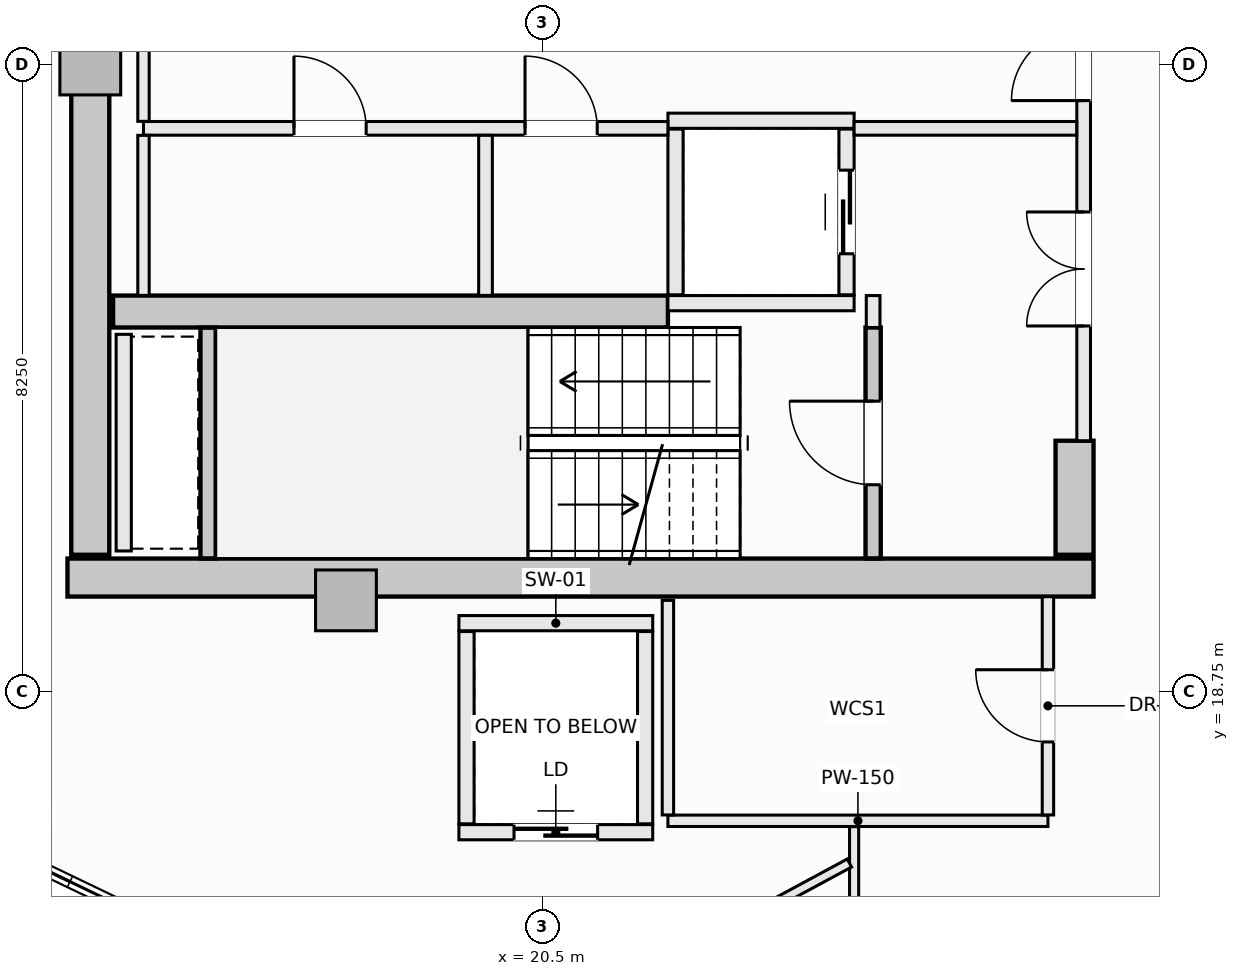
"""IFC4 building model, lengths in metres.
Left out: names, types, materials, properties, quantities, classifications, styles, units other than length and angle.
Written with IfcOpenShell. Run it as: python <this file> out.ifc"""

import sys

from ifc_helpers import new_model, si_unit, direction, frame, frame_2d, origin, origin_2d, place, context, subcontext, project, spatial, rectangle, extrude, element, fill, save


model = new_model("IFC4")
c1 = context("Model", 3, precision=1e-05, world=origin(), true_north=direction((0.0, 1.0)))
c2 = subcontext(c1, "Body", "Model", "MODEL_VIEW")
j1 = project(units=[si_unit("LENGTHUNIT", "METRE"), si_unit("PLANEANGLEUNIT", "RADIAN")], contexts=[c1])
p1 = place(None, origin())
s1 = spatial("IfcSite", under=j1, at=p1, CompositionType="ELEMENT")
p2 = place(p1, origin())
s2 = spatial("IfcBuilding", under=s1, at=p2, CompositionType="ELEMENT")
p3 = place(p2, frame((0.0, 0.0, 252.5)))
s3 = spatial("IfcBuildingStorey", under=s2, at=p3, CompositionType="ELEMENT", Elevation=252.5)
p4 = place(p3, frame((14.25, 20.25, -0.27), z_axis=(0.0, 0.0, 1.0), x_axis=(1.0, 0.0, 0.0)))
e1 = element("IfcWall", 1, at=p4, inside=s3, PredefinedType="SHEAR", context=c2, shape_type="SweptSolid", body=[
    extrude(rectangle(XDim=13.5, YDim=0.5, at=frame_2d((6.75, 0.0))), origin(), (0.0, 0.0, 1.0), 3.3),
])
p5 = place(p3, frame((14.55, 20.55, -0.27), z_axis=(0.0, 0.0, 1.0), x_axis=(0.0, 1.0, 0.0)))
e2 = element("IfcWall", 2, at=p5, inside=s3, PredefinedType="SHEAR", context=c2, shape_type="SweptSolid", body=[
    extrude(rectangle(XDim=12.9, YDim=0.5, at=frame_2d((6.45, 0.0))), origin(), (0.0, 0.0, 1.0), 3.3),
])
p6 = place(p3, frame((27.5, 20.55, -0.27), z_axis=(0.0, 0.0, 1.0), x_axis=(0.0, 1.0, 0.0)))
e3 = element("IfcWall", 3, at=p6, inside=s3, PredefinedType="SHEAR", context=c2, shape_type="SweptSolid", body=[
    extrude(rectangle(XDim=1.5, YDim=0.5, at=frame_2d((0.75, 0.0))), origin(), (0.0, 0.0, 1.0), 3.3),
])
p7 = place(p3, frame((14.85, 23.75, -0.27), z_axis=(0.0, 0.0, 1.0), x_axis=(1.0, 0.0, 0.0)))
e4 = element("IfcWall", 4, at=p7, inside=s3, PredefinedType="SHEAR", context=c2, shape_type="SweptSolid", body=[
    extrude(rectangle(XDim=7.3, YDim=0.42, at=frame_2d((3.65, 0.0))), origin(), (0.0, 0.0, 1.0), 3.3),
])
for number, where, z_axis, x_axis in (
    (5, (14.55, 27.0, -0.27), (0.0, 0.0, 1.0), (1.0, 0.0, 0.0)),
    (6, (17.914, 19.95, -0.27), (0.0, 0.0, 1.0), (1.0, 0.0, 0.0)),
):
    element("IfcColumn", number, at=place(p3, frame(where, z_axis=z_axis, x_axis=x_axis)), inside=s3, PredefinedType="PILASTER", context=c2, shape_type="SweptSolid", body=[
        extrude(rectangle(XDim=0.8, YDim=0.8, at=origin_2d()), origin(), (0.0, 0.0, 1.0), 3.3),
    ])
p8 = place(p3, frame((24.85, 20.502, -0.27), z_axis=(0.0, 0.0, 1.0), x_axis=(0.0, 1.0, 0.0)))
e7 = element("IfcWall", 7, at=p8, inside=s3, PredefinedType="SHEAR", context=c2, shape_type="SweptSolid", body=[
    extrude(rectangle(XDim=3.038, YDim=0.2, at=frame_2d((1.519, 0.0))), origin(), (0.0, 0.0, 1.0), 3.3),
])
p9 = place(p8, frame((0.969, 0.0, 0.27)))
e8 = element("IfcOpeningElement", 8, at=p9, cuts=e7, PredefinedType="OPENING", context=c2, shape_type="SweptSolid", body=[
    extrude(rectangle(XDim=1.1, YDim=2.15, at=frame_2d((0.55, 1.075))), frame((0.0, 0.11, 0.0), z_axis=(0.0, -1.0, 0.0), x_axis=(1.0, 0.0, 0.0)), (0.0, 0.0, 1.0), 0.22),
])
p10 = place(p3, frame((16.1, 20.502, -0.27), z_axis=(0.0, 0.0, 1.0), x_axis=(0.0, 1.0, 0.0)))
e9 = element("IfcWall", 9, at=p10, inside=s3, PredefinedType="SHEAR", context=c2, shape_type="SweptSolid", body=[
    extrude(rectangle(XDim=3.036, YDim=0.2, at=frame_2d((1.518, 0.0))), origin(), (0.0, 0.0, 1.0), 3.3),
])
for number, where, z_axis, x_axis in (
    (10, (22.15, 26.26, 0.0), (0.0, 0.0, 1.0), (1.0, 0.0, 0.0)),
    (11, (22.15, 23.86, 0.0), (0.0, 0.0, 1.0), (1.0, 0.0, 0.0)),
):
    element("IfcWall", number, at=place(p3, frame(where, z_axis=z_axis, x_axis=x_axis)), inside=s3, PredefinedType="SOLIDWALL", context=c2, shape_type="SweptSolid", body=[
        extrude(rectangle(XDim=2.45, YDim=0.2, at=frame_2d((1.225, 0.0))), origin(), (0.0, 0.0, 1.0), 3.03),
    ])
p11 = place(p3, frame((22.25, 23.97, 0.0), z_axis=(0.0, 0.0, 1.0), x_axis=(0.0, 1.0, 0.0)))
e12 = element("IfcWall", 12, at=p11, inside=s3, PredefinedType="SOLIDWALL", context=c2, shape_type="SweptSolid", body=[
    extrude(rectangle(XDim=2.18, YDim=0.2, at=frame_2d((1.09, 0.0))), origin(), (0.0, 0.0, 1.0), 3.03),
])
p12 = place(p3, frame((24.5, 23.97, 0.0), z_axis=(0.0, 0.0, 1.0), x_axis=(0.0, 1.0, 0.0)))
e13 = element("IfcWall", 13, at=p12, inside=s3, PredefinedType="SOLIDWALL", context=c2, shape_type="SweptSolid", body=[
    extrude(rectangle(XDim=2.18, YDim=0.2, at=frame_2d((1.09, 0.0))), origin(), (0.0, 0.0, 1.0), 3.03),
])
p13 = place(p12, frame((0.54, 0.0, 0.0)))
e14 = element("IfcOpeningElement", 14, at=p13, cuts=e13, PredefinedType="OPENING", context=c2, shape_type="SweptSolid", body=[
    extrude(rectangle(XDim=1.1, YDim=2.2, at=frame_2d((0.55, 1.1))), frame((0.0, 0.11, 0.0), z_axis=(0.0, -1.0, 0.0), x_axis=(1.0, 0.0, 0.0)), (0.0, 0.0, 1.0), 0.22),
])
p14 = place(p3, frame((19.4, 19.65, 0.0), z_axis=(0.0, 0.0, 1.0), x_axis=(1.0, 0.0, 0.0)))
e15 = element("IfcWall", 15, at=p14, inside=s3, PredefinedType="SOLIDWALL", context=c2, shape_type="SweptSolid", body=[
    extrude(rectangle(XDim=2.55, YDim=0.2, at=frame_2d((1.275, 0.0))), origin(), (0.0, 0.0, 1.0), 3.03),
])
p15 = place(p3, frame((19.4, 16.9, 0.0), z_axis=(0.0, 0.0, 1.0), x_axis=(1.0, 0.0, 0.0)))
e16 = element("IfcWall", 16, at=p15, inside=s3, PredefinedType="SOLIDWALL", context=c2, shape_type="SweptSolid", body=[
    extrude(rectangle(XDim=2.55, YDim=0.2, at=frame_2d((1.275, 0.0))), origin(), (0.0, 0.0, 1.0), 3.03),
])
p16 = place(p15, frame((0.725, 0.0, 0.0)))
e17 = element("IfcOpeningElement", 17, at=p16, cuts=e16, PredefinedType="OPENING", context=c2, shape_type="SweptSolid", body=[
    extrude(rectangle(XDim=1.1, YDim=2.2, at=frame_2d((0.55, 1.1))), frame((0.0, 0.11, 0.0), z_axis=(0.0, -1.0, 0.0), x_axis=(1.0, 0.0, 0.0)), (0.0, 0.0, 1.0), 0.22),
])
for number, where, z_axis, x_axis in (
    (18, (19.5, 17.01, 0.0), (0.0, 0.0, 1.0), (0.0, 1.0, 0.0)),
    (19, (21.85, 17.01, 0.0), (0.0, 0.0, 1.0), (0.0, 1.0, 0.0)),
):
    element("IfcWall", number, at=place(p3, frame(where, z_axis=z_axis, x_axis=x_axis)), inside=s3, PredefinedType="SOLIDWALL", context=c2, shape_type="SweptSolid", body=[
        extrude(rectangle(XDim=2.53, YDim=0.2, at=frame_2d((1.265, 0.0))), origin(), (0.0, 0.0, 1.0), 3.03),
    ])
p17 = place(p3, frame((14.99, 20.6, 0.0), z_axis=(0.0, 0.0, 1.0), x_axis=(0.0, 1.0, 0.0)))
e20 = element("IfcWall", 20, at=p17, inside=s3, PredefinedType="SOLIDWALL", context=c2, shape_type="SweptSolid", body=[
    extrude(rectangle(XDim=2.85, YDim=0.2, at=frame_2d((1.425, 0.0))), origin(), (0.0, 0.0, 1.0), 3.03),
])
p18 = place(p3, frame((24.85, 23.54, 0.0), z_axis=(0.0, 0.0, 1.0), x_axis=(0.0, 1.0, 0.0)))
e21 = element("IfcWall", 21, at=p18, inside=s3, PredefinedType="SOLIDWALL", context=c2, shape_type="SweptSolid", body=[
    extrude(rectangle(XDim=0.42, YDim=0.18, at=frame_2d((0.21, 0.0))), origin(), (0.0, 0.0, 1.0), 3.03),
])
p19 = place(p3, frame((27.62, 22.05, 0.0), z_axis=(0.0, 0.0, 1.0), x_axis=(0.0, 1.0, 0.0)))
e22 = element("IfcWall", 22, at=p19, inside=s3, PredefinedType="SOLIDWALL", context=c2, shape_type="SweptSolid", body=[
    extrude(rectangle(XDim=9.9, YDim=0.18, at=frame_2d((4.95, 0.0))), origin(), (0.0, 0.0, 1.0), 3.03),
])
p20 = place(p19, frame((4.475, 0.0, 0.0)))
e23 = element("IfcOpeningElement", 23, at=p20, cuts=e22, PredefinedType="OPENING", context=c2, shape_type="SweptSolid", body=[
    extrude(rectangle(XDim=0.95, YDim=2.1, at=frame_2d((0.475, 1.05))), frame((0.0, 0.1, 0.0), z_axis=(0.0, -1.0, 0.0), x_axis=(1.0, 0.0, 0.0)), (0.0, 0.0, 1.0), 0.2),
])
p21 = place(p19, frame((6.89, 0.0, 0.0)))
e24 = element("IfcOpeningElement", 24, at=p21, cuts=e22, PredefinedType="OPENING", context=c2, shape_type="SweptSolid", body=[
    extrude(rectangle(XDim=1.5, YDim=2.2, at=frame_2d((0.75, 1.1))), frame((0.0, 0.1, 0.0), z_axis=(0.0, -1.0, 0.0), x_axis=(1.0, 0.0, 0.0)), (0.0, 0.0, 1.0), 0.2),
])
p22 = place(p19, frame((1.51, 0.0, 0.0)))
e25 = element("IfcOpeningElement", 25, at=p22, cuts=e22, PredefinedType="OPENING", context=c2, shape_type="SweptSolid", body=[
    extrude(rectangle(XDim=1.5, YDim=2.2, at=frame_2d((0.75, 1.1))), frame((0.0, 0.1, 0.0), z_axis=(0.0, -1.0, 0.0), x_axis=(1.0, 0.0, 0.0)), (0.0, 0.0, 1.0), 0.2),
])
p23 = place(p3, frame((15.25, 26.16, 0.0), z_axis=(0.0, 0.0, 1.0), x_axis=(1.0, 0.0, 0.0)))
e26 = element("IfcWall", 26, at=p23, inside=s3, PredefinedType="SOLIDWALL", context=c2, shape_type="SweptSolid", body=[
    extrude(rectangle(XDim=6.9, YDim=0.18, at=frame_2d((3.45, 0.0))), origin(), (0.0, 0.0, 1.0), 3.03),
])
p24 = place(p23, frame((5.02, 0.0, 0.0)))
e27 = element("IfcOpeningElement", 27, at=p24, cuts=e26, PredefinedType="OPENING", context=c2, shape_type="SweptSolid", body=[
    extrude(rectangle(XDim=0.95, YDim=2.1, at=frame_2d((0.475, 1.05))), frame((0.0, 0.1, 0.0), z_axis=(0.0, -1.0, 0.0), x_axis=(1.0, 0.0, 0.0)), (0.0, 0.0, 1.0), 0.2),
])
p25 = place(p23, frame((1.98, 0.0, 0.0)))
e28 = element("IfcOpeningElement", 28, at=p25, cuts=e26, PredefinedType="OPENING", context=c2, shape_type="SweptSolid", body=[
    extrude(rectangle(XDim=0.95, YDim=2.1, at=frame_2d((0.475, 1.05))), frame((0.0, 0.1, 0.0), z_axis=(0.0, -1.0, 0.0), x_axis=(1.0, 0.0, 0.0)), (0.0, 0.0, 1.0), 0.2),
])
p26 = place(p3, frame((24.6, 26.16, 0.0), z_axis=(0.0, 0.0, 1.0), x_axis=(1.0, 0.0, 0.0)))
e29 = element("IfcWall", 29, at=p26, inside=s3, PredefinedType="SOLIDWALL", context=c2, shape_type="SweptSolid", body=[
    extrude(rectangle(XDim=2.928, YDim=0.18, at=frame_2d((1.464, 0.0))), origin(), (0.0, 0.0, 1.0), 3.03),
])
p27 = place(p3, frame((15.25, 23.962, 0.0), z_axis=(0.0, 0.0, 1.0), x_axis=(0.0, 1.0, 0.0)))
e30 = element("IfcWall", 30, at=p27, inside=s3, PredefinedType="PARTITIONING", context=c2, shape_type="SweptSolid", body=[
    extrude(rectangle(XDim=2.106, YDim=0.15, at=frame_2d((1.053, 0.0))), origin(), (0.0, 0.0, 1.0), 3.03),
])
p28 = place(p3, frame((15.25, 26.252, 0.0), z_axis=(0.0, 0.0, 1.0), x_axis=(0.0, 1.0, 0.0)))
e31 = element("IfcWall", 31, at=p28, inside=s3, PredefinedType="PARTITIONING", context=c2, shape_type="SweptSolid", body=[
    extrude(rectangle(XDim=1.496, YDim=0.15, at=frame_2d((0.748, 0.0))), origin(), (0.0, 0.0, 1.0), 3.03),
])
p29 = place(p3, frame((19.75, 23.962, 0.0), z_axis=(0.0, 0.0, 1.0), x_axis=(0.0, 1.0, 0.0)))
e32 = element("IfcWall", 32, at=p29, inside=s3, PredefinedType="SOLIDWALL", context=c2, shape_type="SweptSolid", body=[
    extrude(rectangle(XDim=2.106, YDim=0.18, at=frame_2d((1.053, 0.0))), origin(), (0.0, 0.0, 1.0), 3.03),
])
p30 = place(p3, frame((22.15, 17.05, 0.0), z_axis=(0.0, 0.0, 1.0), x_axis=(1.0, 0.0, 0.0)))
e33 = element("IfcWall", 33, at=p30, inside=s3, PredefinedType="PARTITIONING", context=c2, shape_type="SweptSolid", body=[
    extrude(rectangle(XDim=5.0, YDim=0.15, at=frame_2d((2.5, 0.0))), origin(), (0.0, 0.0, 1.0), 3.03),
])
p31 = place(p3, frame((22.15, 17.127, 0.0), z_axis=(0.0, 0.0, 1.0), x_axis=(0.0, 1.0, 0.0)))
e34 = element("IfcWall", 34, at=p31, inside=s3, PredefinedType="PARTITIONING", context=c2, shape_type="SweptSolid", body=[
    extrude(rectangle(XDim=2.823, YDim=0.15, at=frame_2d((1.412, 0.0))), origin(), (0.0, 0.0, 1.0), 3.03),
])
p32 = place(p3, frame((27.15, 17.127, 0.0), z_axis=(0.0, 0.0, 1.0), x_axis=(0.0, 1.0, 0.0)))
e35 = element("IfcWall", 35, at=p32, inside=s3, PredefinedType="PARTITIONING", context=c2, shape_type="SweptSolid", body=[
    extrude(rectangle(XDim=2.871, YDim=0.15, at=frame_2d((1.436, 0.0))), origin(), (0.0, 0.0, 1.0), 3.03),
])
p33 = place(p32, frame((0.96, 0.0, 0.0)))
e36 = element("IfcOpeningElement", 36, at=p33, cuts=e35, PredefinedType="OPENING", context=c2, shape_type="SweptSolid", body=[
    extrude(rectangle(XDim=0.95, YDim=2.1, at=frame_2d((0.475, 1.05))), frame((0.0, 0.085, 0.0), z_axis=(0.0, -1.0, 0.0), x_axis=(1.0, 0.0, 0.0)), (0.0, 0.0, 1.0), 0.17),
])
p34 = place(p3, frame((24.6, 14.462, 0.0), z_axis=(0.0, 0.0, 1.0), x_axis=(0.0, 1.0, 0.0)))
e37 = element("IfcWall", 37, at=p34, inside=s3, PredefinedType="PARTITIONING", context=c2, shape_type="SweptSolid", body=[
    extrude(rectangle(XDim=2.511, YDim=0.12, at=frame_2d((1.255, 0.0))), origin(), (0.0, 0.0, 1.0), 3.03),
])
p35 = place(p3, frame((17.895, 12.91, 0.0), z_axis=(0.0, 0.0, 1.0), x_axis=(0.880038694226, 0.474901986377, 0.0)))
e38 = element("IfcWall", 38, at=p35, inside=s3, PredefinedType="PARTITIONING", context=c2, shape_type="SweptSolid", body=[
    extrude(rectangle(XDim=7.548, YDim=0.12, at=frame_2d((3.774, 0.0))), origin(), (0.0, 0.0, 1.0), 2.478),
])
p36 = place(p9, origin())
e39 = element("IfcDoor", 39, at=p36, inside=s3, OperationType="SINGLE_SWING_RIGHT", PredefinedType="DOOR", context=c2, shape_type="SweptSolid", body=[
    extrude(rectangle(XDim=1.1, YDim=2.15, at=frame_2d((0.55, 1.075))), frame((0.0, 0.025, 0.0), z_axis=(0.0, -1.0, 0.0), x_axis=(1.0, 0.0, 0.0)), (0.0, 0.0, 1.0), 0.05),
])
fill(e8, e39)
p37 = place(p13, origin())
e40 = element("IfcDoor", 40, at=p37, inside=s3, OperationType="SLIDING_TO_LEFT", PredefinedType="DOOR", context=c2, shape_type="SweptSolid", body=[
    extrude(rectangle(XDim=1.1, YDim=2.2, at=frame_2d((0.55, 1.1))), frame((0.0, 0.025, 0.0), z_axis=(0.0, -1.0, 0.0), x_axis=(1.0, 0.0, 0.0)), (0.0, 0.0, 1.0), 0.05),
])
fill(e14, e40)
p38 = place(p16, origin())
e41 = element("IfcDoor", 41, at=p38, inside=s3, OperationType="SLIDING_TO_LEFT", PredefinedType="DOOR", context=c2, shape_type="SweptSolid", body=[
    extrude(rectangle(XDim=1.1, YDim=2.2, at=frame_2d((0.55, 1.1))), frame((0.0, 0.025, 0.0), z_axis=(0.0, -1.0, 0.0), x_axis=(1.0, 0.0, 0.0)), (0.0, 0.0, 1.0), 0.05),
])
fill(e17, e41)
p39 = place(p20, origin())
e42 = element("IfcDoor", 42, at=p39, inside=s3, OperationType="SINGLE_SWING_LEFT", PredefinedType="DOOR", context=c2, shape_type="SweptSolid", body=[
    extrude(rectangle(XDim=0.95, YDim=2.1, at=frame_2d((0.475, 1.05))), frame((0.0, 0.025, 0.0), z_axis=(0.0, -1.0, 0.0), x_axis=(1.0, 0.0, 0.0)), (0.0, 0.0, 1.0), 0.05),
])
fill(e23, e42)
p40 = place(p22, origin())
e43 = element("IfcDoor", 43, at=p40, inside=s3, OperationType="DOUBLE_DOOR_SINGLE_SWING", PredefinedType="DOOR", context=c2, shape_type="SweptSolid", body=[
    extrude(rectangle(XDim=1.5, YDim=2.2, at=frame_2d((0.75, 1.1))), frame((0.0, 0.025, 0.0), z_axis=(0.0, -1.0, 0.0), x_axis=(1.0, 0.0, 0.0)), (0.0, 0.0, 1.0), 0.05),
])
fill(e25, e43)
p41 = place(p24, origin())
e44 = element("IfcDoor", 44, at=p41, inside=s3, OperationType="SINGLE_SWING_LEFT", PredefinedType="DOOR", context=c2, shape_type="SweptSolid", body=[
    extrude(rectangle(XDim=0.95, YDim=2.1, at=frame_2d((0.475, 1.05))), frame((0.0, 0.025, 0.0), z_axis=(0.0, -1.0, 0.0), x_axis=(1.0, 0.0, 0.0)), (0.0, 0.0, 1.0), 0.05),
])
fill(e27, e44)
p42 = place(p25, origin())
e45 = element("IfcDoor", 45, at=p42, inside=s3, OperationType="SINGLE_SWING_LEFT", PredefinedType="DOOR", context=c2, shape_type="SweptSolid", body=[
    extrude(rectangle(XDim=0.95, YDim=2.1, at=frame_2d((0.475, 1.05))), frame((0.0, 0.025, 0.0), z_axis=(0.0, -1.0, 0.0), x_axis=(1.0, 0.0, 0.0)), (0.0, 0.0, 1.0), 0.05),
])
fill(e28, e45)
p43 = place(p33, origin())
e46 = element("IfcDoor", 46, at=p43, inside=s3, OperationType="SINGLE_SWING_RIGHT", PredefinedType="DOOR", context=c2, shape_type="SweptSolid", body=[
    extrude(rectangle(XDim=0.95, YDim=2.1, at=frame_2d((0.475, 1.05))), frame((0.0, 0.025, 0.0), z_axis=(0.0, -1.0, 0.0), x_axis=(1.0, 0.0, 0.0)), (0.0, 0.0, 1.0), 0.05),
])
fill(e36, e46)
save(model, sys.argv[1])
